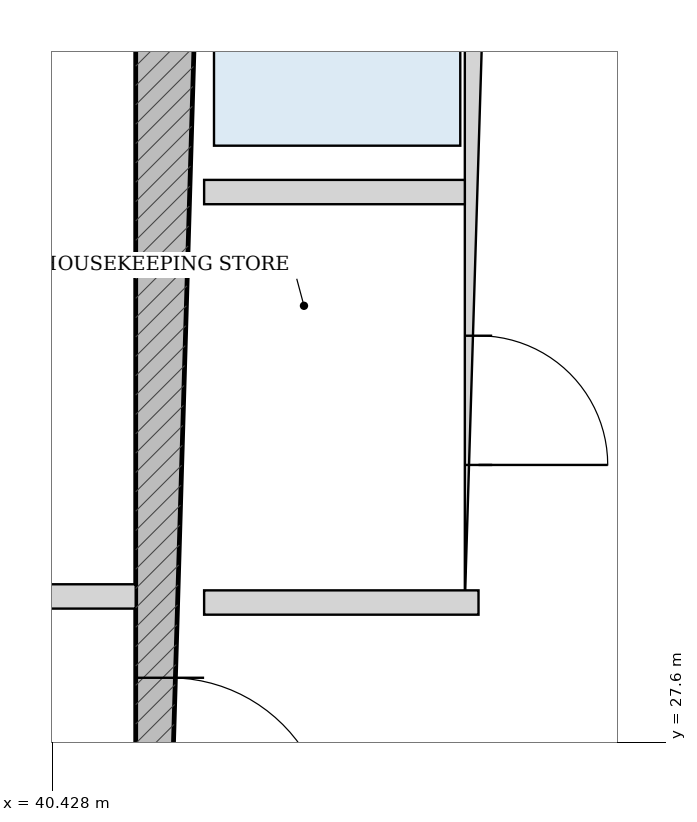
"""IFC4 building model, lengths in metres.
Left out: names, types, materials, properties, quantities, classifications, styles, units other than length and angle.
Written with IfcOpenShell. Run it as: python <this file> out.ifc"""

import sys

from ifc_helpers import new_model, si_unit, direction, frame, frame_2d, origin, place, context, subcontext, project, spatial, rectangle, extrude, source, transform, mapped, element, fill, save


model = new_model("IFC4")
c1 = context("Model", 3, precision=1e-05, world=origin(), true_north=direction((-0.2419218956, 0.970295726276)))
c2 = subcontext(c1, "Body", "Model", "MODEL_VIEW")
j1 = project(units=[si_unit("LENGTHUNIT", "METRE"), si_unit("PLANEANGLEUNIT", "RADIAN")], contexts=[c1])
p1 = place(None, origin())
s1 = spatial("IfcSite", under=j1, at=p1, CompositionType="ELEMENT")
p2 = place(p1, origin())
s2 = spatial("IfcBuilding", under=s1, at=p2, CompositionType="ELEMENT")
p3 = place(p2, frame((0.0, 0.0, 135.4)))
s3 = spatial("IfcBuildingStorey", under=s2, at=p3, CompositionType="ELEMENT", Elevation=135.4)
p4 = place(p3, frame((41.2, 19.175, 0.0), z_axis=(0.0, 0.0, 1.0), x_axis=(0.0, 1.0, 0.0)))
e1 = element("IfcWall", 1, at=p4, inside=s3, PredefinedType="SHEAR", context=c2, shape_type="SweptSolid", body=[
    extrude(rectangle(XDim=15.25, YDim=0.45, at=frame_2d((7.625, 0.0))), origin(), (0.0, 0.0, 1.0), 3.33),
])
p5 = place(p4, frame((7.8, 0.0, 0.0)))
e2 = element("IfcOpeningElement", 2, at=p5, cuts=e1, PredefinedType="OPENING", context=c2, shape_type="SweptSolid", body=[
    extrude(rectangle(XDim=1.05, YDim=2.15, at=frame_2d((0.525, 1.075))), frame((0.0, 0.235, 0.0), z_axis=(0.0, -1.0, 0.0), x_axis=(1.0, 0.0, 0.0)), (0.0, 0.0, 1.0), 0.47),
])
p6 = place(p3, frame((43.23, 28.52, 0.0), z_axis=(0.0, 0.0, 1.0), x_axis=(0.0, 1.0, 0.0)))
e3 = element("IfcWall", 3, at=p6, inside=s3, PredefinedType="PARTITIONING", context=c2, shape_type="SweptSolid", body=[
    extrude(rectangle(XDim=5.905, YDim=0.18, at=frame_2d((2.953, 0.0))), origin(), (0.0, 0.0, 1.0), 3.33),
])
p7 = place(p6, frame((0.905, 0.0, 0.0)))
e4 = element("IfcOpeningElement", 4, at=p7, cuts=e3, PredefinedType="OPENING", context=c2, shape_type="SweptSolid", body=[
    extrude(rectangle(XDim=0.85, YDim=2.1, at=frame_2d((0.425, 1.05))), frame((0.0, 0.1, 0.0), z_axis=(0.0, -1.0, 0.0), x_axis=(1.0, 0.0, 0.0)), (0.0, 0.0, 1.0), 0.2),
])
p8 = place(p6, frame((3.655, 0.0, 0.0)))
e5 = element("IfcOpeningElement", 5, at=p8, cuts=e3, PredefinedType="OPENING", context=c2, shape_type="SweptSolid", body=[
    extrude(rectangle(XDim=1.15, YDim=2.2, at=frame_2d((0.575, 1.1))), frame((0.0, 0.1, 0.0), z_axis=(0.0, -1.0, 0.0), x_axis=(1.0, 0.0, 0.0)), (0.0, 0.0, 1.0), 0.2),
])
p9 = place(p3, frame((41.425, 31.22, 0.0), z_axis=(0.0, 0.0, 1.0), x_axis=(1.0, 0.0, 0.0)))
e6 = element("IfcWall", 6, at=p9, inside=s3, PredefinedType="PARTITIONING", context=c2, shape_type="SweptSolid", body=[
    extrude(rectangle(XDim=1.715, YDim=0.16, at=frame_2d((0.857, 0.0))), origin(), (0.0, 0.0, 1.0), 3.33),
])
p10 = place(p3, frame((41.425, 28.52, 0.0), z_axis=(0.0, 0.0, 1.0), x_axis=(1.0, 0.0, 0.0)))
e7 = element("IfcWall", 7, at=p10, inside=s3, PredefinedType="PARTITIONING", context=c2, shape_type="SweptSolid", body=[
    extrude(rectangle(XDim=1.805, YDim=0.16, at=frame_2d((0.902, 0.0))), origin(), (0.0, 0.0, 1.0), 3.33),
])
p11 = place(p3, frame((35.025, 28.56, 0.0), z_axis=(0.0, 0.0, 1.0), x_axis=(1.0, 0.0, 0.0)))
e8 = element("IfcWall", 8, at=p11, inside=s3, PredefinedType="PARTITIONING", context=c2, shape_type="SweptSolid", body=[
    extrude(rectangle(XDim=5.95, YDim=0.16, at=frame_2d((2.975, 0.0))), origin(), (0.0, 0.0, 1.0), 3.33),
])
p12 = place(p11, frame((1.008, 0.0, 0.0)))
e9 = element("IfcOpeningElement", 9, at=p12, cuts=e8, PredefinedType="OPENING", context=c2, shape_type="SweptSolid", body=[
    extrude(rectangle(XDim=0.86, YDim=2.1, at=frame_2d((0.43, 1.05))), frame((0.0, 0.09, 0.0), z_axis=(0.0, -1.0, 0.0), x_axis=(1.0, 0.0, 0.0)), (0.0, 0.0, 1.0), 0.18),
])
p13 = place(p11, frame((4.087, 0.0, 0.0)))
e10 = element("IfcOpeningElement", 10, at=p13, cuts=e8, PredefinedType="OPENING", context=c2, shape_type="SweptSolid", body=[
    extrude(rectangle(XDim=0.85, YDim=2.1, at=frame_2d((0.425, 1.05))), frame((0.0, 0.09, 0.0), z_axis=(0.0, -1.0, 0.0), x_axis=(1.0, 0.0, 0.0)), (0.0, 0.0, 1.0), 0.18),
])
m1 = source(origin(), c2, "Body", "SweptSolid", [
    extrude(rectangle(XDim=1.05, YDim=2.15, at=frame_2d((0.525, 1.075))), frame((0.0, 0.025, 0.0), z_axis=(0.0, -1.0, 0.0), x_axis=(1.0, 0.0, 0.0)), (0.0, 0.0, 1.0), 0.05),
])
p14 = place(p5, frame((1.05, 0.0, 0.0), z_axis=(0.0, 0.0, 1.0), x_axis=(-1.0, 0.0, 0.0)))
e11 = element("IfcDoor", 11, at=p14, inside=s3, OperationType="SINGLE_SWING_RIGHT", PredefinedType="DOOR", context=c2, shape_type="MappedRepresentation", body=[
    mapped(m1, transform((0.0, 0.0, 0.0), scale=1.0)),
])
fill(e2, e11)
m2 = source(origin(), c2, "Body", "SweptSolid", [
    extrude(rectangle(XDim=0.85, YDim=2.1, at=frame_2d((0.425, 1.05))), frame((0.0, 0.025, 0.0), z_axis=(0.0, -1.0, 0.0), x_axis=(1.0, 0.0, 0.0)), (0.0, 0.0, 1.0), 0.05),
])
p15 = place(p7, frame((0.85, 0.0, 0.0), z_axis=(0.0, 0.0, 1.0), x_axis=(-1.0, 0.0, 0.0)))
e12 = element("IfcDoor", 12, at=p15, inside=s3, OperationType="SINGLE_SWING_RIGHT", PredefinedType="DOOR", context=c2, shape_type="MappedRepresentation", body=[
    mapped(m2, transform((0.0, 0.0, 0.0), scale=1.0)),
])
fill(e4, e12)
save(model, sys.argv[1])
